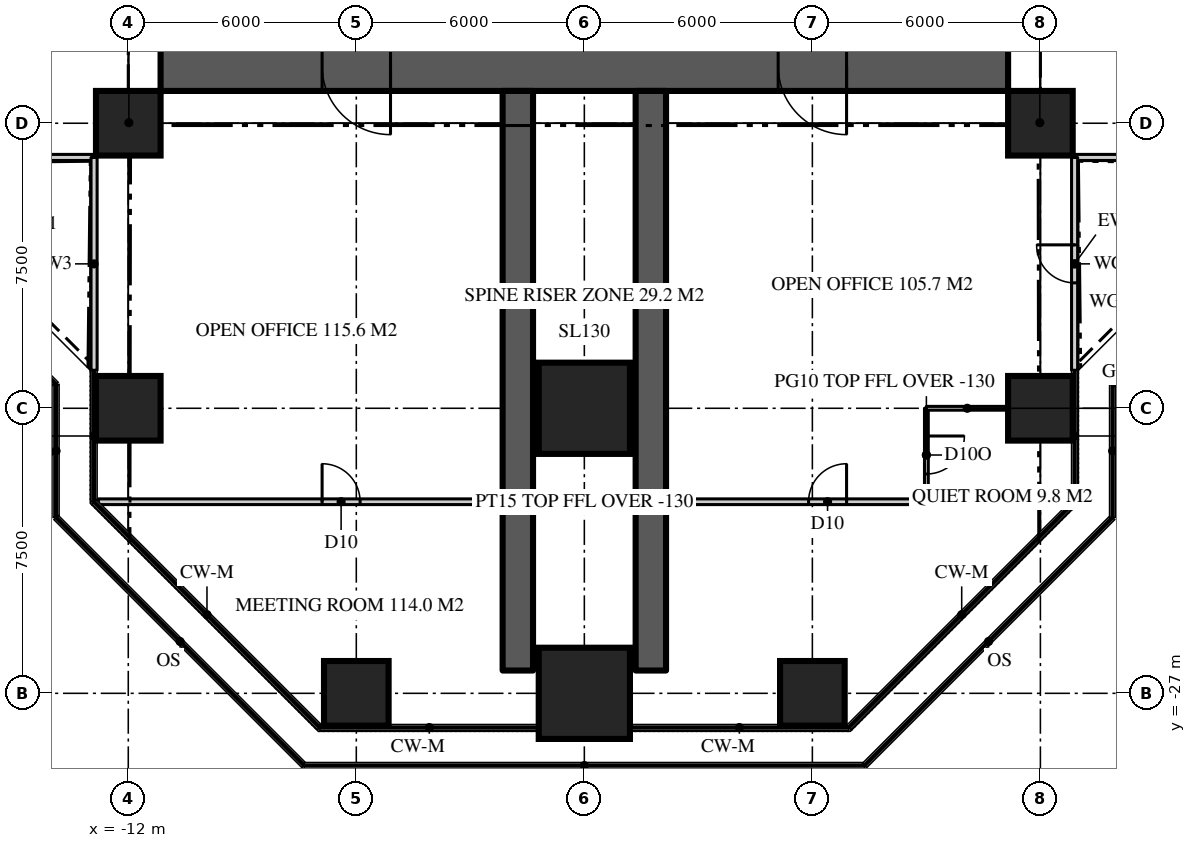
"""IFC4 building model, lengths in metres.
Left out: names, types, materials, properties, quantities, classifications, styles, units other than length and angle.
Written with IfcOpenShell. Run it as: python <this file> out.ifc"""

import sys

from ifc_helpers import new_model, si_unit, direction, frame, frame_2d, origin, origin_2d, place, context, subcontext, project, spatial, rectangle, extrude, element, fill, save


model = new_model("IFC4")
c1 = context("Model", 3, precision=1e-05, world=origin(), true_north=direction((0.0, 1.0)))
c2 = subcontext(c1, "Body", "Model", "MODEL_VIEW")
j1 = project(units=[si_unit("LENGTHUNIT", "METRE"), si_unit("PLANEANGLEUNIT", "RADIAN")], contexts=[c1])
p1 = place(None, origin())
s1 = spatial("IfcSite", under=j1, at=p1, CompositionType="ELEMENT")
p2 = place(p1, origin())
s2 = spatial("IfcBuilding", under=s1, at=p2, CompositionType="ELEMENT")
p3 = place(p2, frame((0.0, 0.0, 132.0)))
s3 = spatial("IfcBuildingStorey", under=s2, at=p3, CompositionType="ELEMENT", Elevation=132.0)
p4 = place(p3, frame((11.15, -10.5, 0.0), z_axis=(0.0, 0.0, 1.0), x_axis=(-1.0, 0.0, 0.0)))
e1 = element("IfcWall", 1, at=p4, inside=s3, PredefinedType="SHEAR", context=c2, shape_type="SweptSolid", body=[
    extrude(rectangle(XDim=22.3, YDim=1.3, at=frame_2d((11.15, 0.0))), origin(), (0.0, 0.0, 1.0), 3.9),
])
p5 = place(p4, frame((16.25, 0.0, 0.0)))
e2 = element("IfcOpeningElement", 2, at=p5, cuts=e1, PredefinedType="OPENING", context=c2, shape_type="SweptSolid", body=[
    extrude(rectangle(XDim=1.8, YDim=2.2, at=frame_2d((0.9, 1.1))), frame((0.0, 0.66, 0.0), z_axis=(0.0, -1.0, 0.0), x_axis=(1.0, 0.0, 0.0)), (0.0, 0.0, 1.0), 1.32),
])
p6 = place(p4, frame((4.25, 0.0, 0.0)))
e3 = element("IfcOpeningElement", 3, at=p6, cuts=e1, PredefinedType="OPENING", context=c2, shape_type="SweptSolid", body=[
    extrude(rectangle(XDim=1.8, YDim=2.2, at=frame_2d((0.9, 1.1))), frame((0.0, 0.66, 0.0), z_axis=(0.0, -1.0, 0.0), x_axis=(1.0, 0.0, 0.0)), (0.0, 0.0, 1.0), 1.32),
])
for number, where, z_axis, x_axis in (
    (4, (-1.75, -11.15, 0.0), (0.0, 0.0, 1.0), (0.0, -1.0, 0.0)),
    (5, (1.75, -11.15, 0.0), (0.0, 0.0, 1.0), (0.0, -1.0, 0.0)),
):
    element("IfcWall", number, at=place(p3, frame(where, z_axis=z_axis, x_axis=x_axis)), inside=s3, PredefinedType="SHEAR", context=c2, shape_type="SweptSolid", body=[
        extrude(rectangle(XDim=15.25, YDim=0.8, at=frame_2d((7.625, 0.0))), origin(), (0.0, 0.0, 1.0), 3.9),
    ])
p7 = place(p3, frame((-6.0, -27.0, 0.0), z_axis=(0.0, 0.0, 1.0), x_axis=(1.0, 0.0, 0.0)))
e6 = element("IfcColumn", 6, at=p7, inside=s3, PredefinedType="COLUMN", context=c2, shape_type="SweptSolid", body=[
    extrude(rectangle(XDim=1.7, YDim=1.7, at=origin_2d()), origin(), (0.0, 0.0, 1.0), 3.9),
])
p8 = place(p3, frame((0.0, -27.0, 0.0), z_axis=(0.0, 0.0, 1.0), x_axis=(1.0, 0.0, 0.0)))
e7 = element("IfcColumn", 7, at=p8, inside=s3, PredefinedType="COLUMN", context=c2, shape_type="SweptSolid", body=[
    extrude(rectangle(XDim=2.4, YDim=2.4, at=origin_2d()), origin(), (0.0, 0.0, 1.0), 3.9),
])
for number, where, z_axis, x_axis in (
    (8, (6.0, -27.0, 0.0), (0.0, 0.0, 1.0), (1.0, 0.0, 0.0)),
    (9, (-12.0, -19.5, 0.0), (0.0, 0.0, 1.0), (1.0, 0.0, 0.0)),
):
    element("IfcColumn", number, at=place(p3, frame(where, z_axis=z_axis, x_axis=x_axis)), inside=s3, PredefinedType="COLUMN", context=c2, shape_type="SweptSolid", body=[
        extrude(rectangle(XDim=1.7, YDim=1.7, at=origin_2d()), origin(), (0.0, 0.0, 1.0), 3.9),
    ])
p9 = place(p3, frame((0.0, -19.5, 0.0), z_axis=(0.0, 0.0, 1.0), x_axis=(1.0, 0.0, 0.0)))
e10 = element("IfcColumn", 10, at=p9, inside=s3, PredefinedType="COLUMN", context=c2, shape_type="SweptSolid", body=[
    extrude(rectangle(XDim=2.4, YDim=2.4, at=origin_2d()), origin(), (0.0, 0.0, 1.0), 3.9),
])
for number, where, z_axis, x_axis in (
    (11, (12.0, -19.5, 0.0), (0.0, 0.0, 1.0), (1.0, 0.0, 0.0)),
    (12, (-12.0, -12.0, 0.0), (0.0, 0.0, 1.0), (1.0, 0.0, 0.0)),
    (13, (12.0, -12.0, 0.0), (0.0, 0.0, 1.0), (1.0, 0.0, 0.0)),
):
    element("IfcColumn", number, at=place(p3, frame(where, z_axis=z_axis, x_axis=x_axis)), inside=s3, PredefinedType="COLUMN", context=c2, shape_type="SweptSolid", body=[
        extrude(rectangle(XDim=1.7, YDim=1.7, at=origin_2d()), origin(), (0.0, 0.0, 1.0), 3.9),
    ])
p10 = place(p3, frame((12.9, -12.9, 0.0), z_axis=(0.0, 0.0, 1.0), x_axis=(1.0, 0.0, 0.0)))
e14 = element("IfcWall", 14, at=p10, inside=s3, PredefinedType="SOLIDWALL", context=c2, shape_type="SweptSolid", body=[
    extrude(rectangle(XDim=5.6, YDim=0.16, at=frame_2d((2.8, 0.0))), origin(), (0.0, 0.0, 1.0), 3.77),
])
p11 = place(p3, frame((-18.5, -12.9, 0.0), z_axis=(0.0, 0.0, 1.0), x_axis=(1.0, 0.0, 0.0)))
e15 = element("IfcWall", 15, at=p11, inside=s3, PredefinedType="SOLIDWALL", context=c2, shape_type="SweptSolid", body=[
    extrude(rectangle(XDim=5.6, YDim=0.16, at=frame_2d((2.8, 0.0))), origin(), (0.0, 0.0, 1.0), 3.77),
])
p12 = place(p11, frame((2.3, 0.0, 0.0)))
e16 = element("IfcOpeningElement", 16, at=p12, cuts=e15, PredefinedType="OPENING", context=c2, shape_type="SweptSolid", body=[
    extrude(rectangle(XDim=1.0, YDim=2.2, at=frame_2d((0.5, 1.1))), frame((0.0, 0.09, 0.0), z_axis=(0.0, -1.0, 0.0), x_axis=(1.0, 0.0, 0.0)), (0.0, 0.0, 1.0), 0.18),
])
p13 = place(p3, frame((-12.9, -12.9, 0.0), z_axis=(0.0, 0.0, 1.0), x_axis=(0.0, -1.0, 0.0)))
e17 = element("IfcWall", 17, at=p13, inside=s3, PredefinedType="SOLIDWALL", context=c2, shape_type="SweptSolid", body=[
    extrude(rectangle(XDim=5.6, YDim=0.16, at=frame_2d((2.8, 0.0))), origin(), (0.0, 0.0, 1.0), 3.77),
])
p14 = place(p3, frame((12.9, -18.5, 0.0), z_axis=(0.0, 0.0, 1.0), x_axis=(0.0, 1.0, 0.0)))
e18 = element("IfcWall", 18, at=p14, inside=s3, PredefinedType="SOLIDWALL", context=c2, shape_type="SweptSolid", body=[
    extrude(rectangle(XDim=5.6, YDim=0.16, at=frame_2d((2.8, 0.0))), origin(), (0.0, 0.0, 1.0), 3.77),
])
p15 = place(p14, frame((2.3, 0.0, 0.0)))
e19 = element("IfcOpeningElement", 19, at=p15, cuts=e18, PredefinedType="OPENING", context=c2, shape_type="SweptSolid", body=[
    extrude(rectangle(XDim=1.0, YDim=2.2, at=frame_2d((0.5, 1.1))), frame((0.0, 0.09, 0.0), z_axis=(0.0, -1.0, 0.0), x_axis=(1.0, 0.0, 0.0)), (0.0, 0.0, 1.0), 0.18),
])
p16 = place(p3, frame((-12.786, -21.959, 0.0), z_axis=(0.0, 0.0, 1.0), x_axis=(1.0, 0.0, 0.0)))
e20 = element("IfcWall", 20, at=p16, inside=s3, PredefinedType="PARTITIONING", context=c2, shape_type="SweptSolid", body=[
    extrude(rectangle(XDim=25.573, YDim=0.15, at=frame_2d((12.786, 0.0))), origin(), (0.0, 0.0, 1.0), 3.77),
])
p17 = place(p16, frame((18.687, 0.0, 0.0)))
e21 = element("IfcOpeningElement", 21, at=p17, cuts=e20, PredefinedType="OPENING", context=c2, shape_type="SweptSolid", body=[
    extrude(rectangle(XDim=1.0, YDim=2.2, at=frame_2d((0.5, 1.1))), frame((0.0, 0.085, 0.0), z_axis=(0.0, -1.0, 0.0), x_axis=(1.0, 0.0, 0.0)), (0.0, 0.0, 1.0), 0.17),
])
p18 = place(p16, frame((5.886, 0.0, 0.0)))
e22 = element("IfcOpeningElement", 22, at=p18, cuts=e20, PredefinedType="OPENING", context=c2, shape_type="SweptSolid", body=[
    extrude(rectangle(XDim=1.0, YDim=2.2, at=frame_2d((0.5, 1.1))), frame((0.0, 0.085, 0.0), z_axis=(0.0, -1.0, 0.0), x_axis=(1.0, 0.0, 0.0)), (0.0, 0.0, 1.0), 0.17),
])
p19 = place(p3, frame((9.0, -19.5, 0.0), z_axis=(0.0, 0.0, 1.0), x_axis=(0.0, -1.0, 0.0)))
e23 = element("IfcWall", 23, at=p19, inside=s3, PredefinedType="PARTITIONING", context=c2, shape_type="SweptSolid", body=[
    extrude(rectangle(XDim=2.459, YDim=0.1, at=frame_2d((1.229, 0.0))), origin(), (0.0, 0.0, 1.0), 3.77),
])
p20 = place(p19, frame((0.729, 0.0, 0.0)))
e24 = element("IfcOpeningElement", 24, at=p20, cuts=e23, PredefinedType="OPENING", context=c2, shape_type="SweptSolid", body=[
    extrude(rectangle(XDim=1.0, YDim=2.2, at=frame_2d((0.5, 1.1))), frame((0.0, 0.06, 0.0), z_axis=(0.0, -1.0, 0.0), x_axis=(1.0, 0.0, 0.0)), (0.0, 0.0, 1.0), 0.12),
])
p21 = place(p3, frame((9.0, -19.5, 0.0), z_axis=(0.0, 0.0, 1.0), x_axis=(1.0, 0.0, 0.0)))
e25 = element("IfcWall", 25, at=p21, inside=s3, PredefinedType="PARTITIONING", context=c2, shape_type="SweptSolid", body=[
    extrude(rectangle(XDim=2.15, YDim=0.1, at=frame_2d((1.075, 0.0))), origin(), (0.0, 0.0, 1.0), 2.77),
])
for number, where, z_axis, x_axis in (
    (26, (-11.15, -11.15, 0.0), (0.0, 0.0, 1.0), (-0.707, -0.707, 0.0)),
    (27, (11.15, -11.15, 0.0), (0.0, 0.0, 1.0), (0.707, -0.707, 0.0)),
):
    element("IfcWall", number, at=place(p3, frame(where, z_axis=z_axis, x_axis=x_axis)), inside=s3, PredefinedType="PARTITIONING", context=c2, shape_type="SweptSolid", body=[
        extrude(rectangle(XDim=2.362, YDim=0.15, at=frame_2d((1.181, 0.0))), origin(), (0.0, 0.0, 1.0), 3.22),
    ])
p22 = place(p15, origin())
e28 = element("IfcDoor", 28, at=p22, inside=s3, OperationType="SINGLE_SWING_RIGHT", PredefinedType="DOOR", context=c2, shape_type="SweptSolid", body=[
    extrude(rectangle(XDim=1.0, YDim=2.2, at=frame_2d((0.5, 1.1))), frame((0.0, 0.025, 0.0), z_axis=(0.0, -1.0, 0.0), x_axis=(1.0, 0.0, 0.0)), (0.0, 0.0, 1.0), 0.05),
])
fill(e19, e28)
p23 = place(p5, origin())
e29 = element("IfcDoor", 29, at=p23, inside=s3, OperationType="DOUBLE_DOOR_DOUBLE_SWING", PredefinedType="DOOR", context=c2, shape_type="SweptSolid", body=[
    extrude(rectangle(XDim=1.8, YDim=2.2, at=frame_2d((0.9, 1.1))), frame((0.0, 0.025, 0.0), z_axis=(0.0, -1.0, 0.0), x_axis=(1.0, 0.0, 0.0)), (0.0, 0.0, 1.0), 0.05),
])
fill(e2, e29)
p24 = place(p6, origin())
e30 = element("IfcDoor", 30, at=p24, inside=s3, OperationType="DOUBLE_DOOR_DOUBLE_SWING", PredefinedType="DOOR", context=c2, shape_type="SweptSolid", body=[
    extrude(rectangle(XDim=1.8, YDim=2.2, at=frame_2d((0.9, 1.1))), frame((0.0, 0.025, 0.0), z_axis=(0.0, -1.0, 0.0), x_axis=(1.0, 0.0, 0.0)), (0.0, 0.0, 1.0), 0.05),
])
fill(e3, e30)
p25 = place(p17, origin())
e31 = element("IfcDoor", 31, at=p25, inside=s3, OperationType="SINGLE_SWING_RIGHT", PredefinedType="DOOR", context=c2, shape_type="SweptSolid", body=[
    extrude(rectangle(XDim=1.0, YDim=2.2, at=frame_2d((0.5, 1.1))), frame((0.0, 0.025, 0.0), z_axis=(0.0, -1.0, 0.0), x_axis=(1.0, 0.0, 0.0)), (0.0, 0.0, 1.0), 0.05),
])
fill(e21, e31)
p26 = place(p18, origin())
e32 = element("IfcDoor", 32, at=p26, inside=s3, OperationType="SINGLE_SWING_LEFT", PredefinedType="DOOR", context=c2, shape_type="SweptSolid", body=[
    extrude(rectangle(XDim=1.0, YDim=2.2, at=frame_2d((0.5, 1.1))), frame((0.0, 0.025, 0.0), z_axis=(0.0, -1.0, 0.0), x_axis=(1.0, 0.0, 0.0)), (0.0, 0.0, 1.0), 0.05),
])
fill(e22, e32)
p27 = place(p20, origin())
e33 = element("IfcDoor", 33, at=p27, inside=s3, OperationType="SINGLE_SWING_LEFT", PredefinedType="DOOR", context=c2, shape_type="SweptSolid", body=[
    extrude(rectangle(XDim=1.0, YDim=2.2, at=frame_2d((0.5, 1.1))), frame((0.0, 0.025, 0.0), z_axis=(0.0, -1.0, 0.0), x_axis=(1.0, 0.0, 0.0)), (0.0, 0.0, 1.0), 0.05),
])
fill(e24, e33)
save(model, sys.argv[1])
